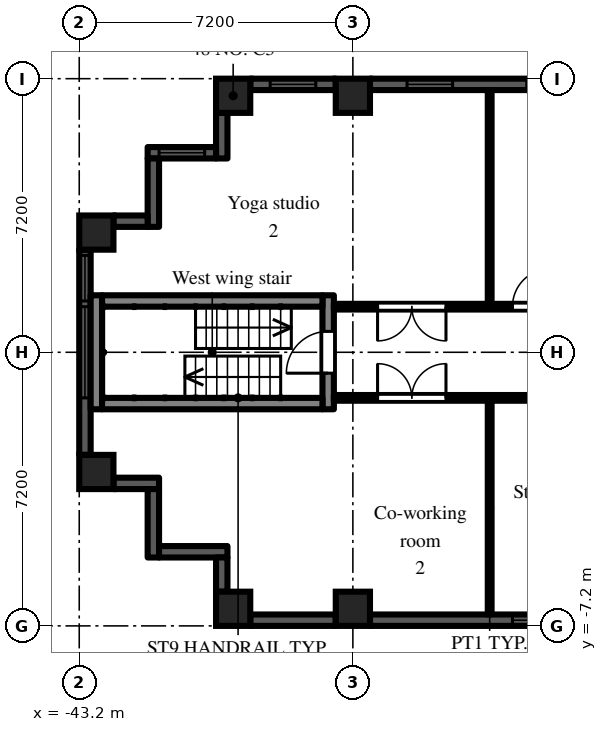
"""IFC4 building model, lengths in metres.
Left out: names, types, materials, properties, quantities, classifications, styles, units other than length and angle.
Written with IfcOpenShell. Run it as: python <this file> out.ifc"""

import sys

from ifc_helpers import new_model, si_unit, direction, frame, frame_2d, origin, origin_2d, place, context, subcontext, project, spatial, rectangle, extrude, element, fill, save


model = new_model("IFC4")
c1 = context("Model", 3, precision=1e-05, world=origin(), true_north=direction((0.0, 1.0)))
c2 = subcontext(c1, "Body", "Model", "MODEL_VIEW")
j1 = project(units=[si_unit("LENGTHUNIT", "METRE"), si_unit("PLANEANGLEUNIT", "RADIAN")], contexts=[c1])
p1 = place(None, origin())
s1 = spatial("IfcSite", under=j1, at=p1, CompositionType="ELEMENT")
p2 = place(p1, origin())
s2 = spatial("IfcBuilding", under=s1, at=p2, CompositionType="ELEMENT")
p3 = place(p2, frame((0.0, 0.0, 93.9)))
s3 = spatial("IfcBuildingStorey", under=s2, at=p3, CompositionType="ELEMENT", Elevation=93.9)
for number, where, z_axis, x_axis in (
    (1, (-42.75, -3.15, 0.0), (0.0, 0.0, 1.0), (1.0, 0.0, 0.0)),
    (2, (-42.75, 3.15, 0.0), (0.0, 0.0, 1.0), (1.0, 0.0, 0.0)),
    (3, (-39.15, -6.75, 0.0), (0.0, 0.0, 1.0), (1.0, 0.0, 0.0)),
    (4, (-39.15, 6.75, 0.0), (0.0, 0.0, 1.0), (1.0, 0.0, 0.0)),
    (5, (-36.0, -6.75, 0.0), (0.0, 0.0, 1.0), (1.0, 0.0, 0.0)),
    (6, (-36.0, 6.75, 0.0), (0.0, 0.0, 1.0), (1.0, 0.0, 0.0)),
):
    element("IfcColumn", number, at=place(p3, frame(where, z_axis=z_axis, x_axis=x_axis)), inside=s3, PredefinedType="COLUMN", context=c2, shape_type="SweptSolid", body=[
        extrude(rectangle(XDim=0.9, YDim=0.9, at=origin_2d()), origin(), (0.0, 0.0, 1.0), 3.0),
    ])
p4 = place(p3, frame((-29.25, 7.05, 0.0), z_axis=(0.0, 0.0, 1.0), x_axis=(-1.0, 0.0, 0.0)))
e7 = element("IfcWall", 7, at=p4, inside=s3, PredefinedType="SOLIDWALL", context=c2, shape_type="SweptSolid", body=[
    extrude(rectangle(XDim=6.3, YDim=0.3, at=frame_2d((3.15, 0.0))), origin(), (0.0, 0.0, 1.0), 2.1),
])
p5 = place(p4, frame((0.975, 0.0, 0.2)))
e8 = element("IfcOpeningElement", 8, at=p5, cuts=e7, PredefinedType="OPENING", context=c2, shape_type="SweptSolid", body=[
    extrude(rectangle(XDim=1.2, YDim=1.85, at=frame_2d((0.6, 0.925))), frame((0.0, 0.16, 0.0), z_axis=(0.0, -1.0, 0.0), x_axis=(1.0, 0.0, 0.0)), (0.0, 0.0, 1.0), 0.32),
])
p6 = place(p4, frame((4.125, 0.0, 0.2)))
e9 = element("IfcOpeningElement", 9, at=p6, cuts=e7, PredefinedType="OPENING", context=c2, shape_type="SweptSolid", body=[
    extrude(rectangle(XDim=1.2, YDim=1.85, at=frame_2d((0.6, 0.925))), frame((0.0, 0.16, 0.0), z_axis=(0.0, -1.0, 0.0), x_axis=(1.0, 0.0, 0.0)), (0.0, 0.0, 1.0), 0.32),
])
p7 = place(p3, frame((-36.45, 7.05, 0.0), z_axis=(0.0, 0.0, 1.0), x_axis=(-1.0, 0.0, 0.0)))
e10 = element("IfcWall", 10, at=p7, inside=s3, PredefinedType="SOLIDWALL", context=c2, shape_type="SweptSolid", body=[
    extrude(rectangle(XDim=2.25, YDim=0.3, at=frame_2d((1.125, 0.0))), origin(), (0.0, 0.0, 1.0), 2.1),
])
p8 = place(p7, frame((0.525, 0.0, 0.2)))
e11 = element("IfcOpeningElement", 11, at=p8, cuts=e10, PredefinedType="OPENING", context=c2, shape_type="SweptSolid", body=[
    extrude(rectangle(XDim=1.2, YDim=1.85, at=frame_2d((0.6, 0.925))), frame((0.0, 0.16, 0.0), z_axis=(0.0, -1.0, 0.0), x_axis=(1.0, 0.0, 0.0)), (0.0, 0.0, 1.0), 0.32),
])
p9 = place(p3, frame((-39.45, 6.3, 0.0), z_axis=(0.0, 0.0, 1.0), x_axis=(0.0, -1.0, 0.0)))
e12 = element("IfcWall", 12, at=p9, inside=s3, PredefinedType="SOLIDWALL", context=c2, shape_type="SweptSolid", body=[
    extrude(rectangle(XDim=1.2, YDim=0.3, at=frame_2d((0.6, 0.0))), origin(), (0.0, 0.0, 1.0), 2.575),
])
p10 = place(p3, frame((-39.6, 5.25, 0.0), z_axis=(0.0, 0.0, 1.0), x_axis=(-1.0, 0.0, 0.0)))
e13 = element("IfcWall", 13, at=p10, inside=s3, PredefinedType="SOLIDWALL", context=c2, shape_type="SweptSolid", body=[
    extrude(rectangle(XDim=1.8, YDim=0.3, at=frame_2d((0.9, 0.0))), origin(), (0.0, 0.0, 1.0), 2.575),
])
p11 = place(p10, frame((0.3, 0.0, 0.2)))
e14 = element("IfcOpeningElement", 14, at=p11, cuts=e13, PredefinedType="OPENING", context=c2, shape_type="SweptSolid", body=[
    extrude(rectangle(XDim=1.2, YDim=1.85, at=frame_2d((0.6, 0.925))), frame((0.0, 0.16, 0.0), z_axis=(0.0, -1.0, 0.0), x_axis=(1.0, 0.0, 0.0)), (0.0, 0.0, 1.0), 0.32),
])
p12 = place(p3, frame((-41.25, 5.1, 0.0), z_axis=(0.0, 0.0, 1.0), x_axis=(0.0, -1.0, 0.0)))
e15 = element("IfcWall", 15, at=p12, inside=s3, PredefinedType="SOLIDWALL", context=c2, shape_type="SweptSolid", body=[
    extrude(rectangle(XDim=1.8, YDim=0.3, at=frame_2d((0.9, 0.0))), origin(), (0.0, 0.0, 1.0), 2.575),
])
p13 = place(p3, frame((-41.4, 3.45, 0.0), z_axis=(0.0, 0.0, 1.0), x_axis=(-1.0, 0.0, 0.0)))
e16 = element("IfcWall", 16, at=p13, inside=s3, PredefinedType="SOLIDWALL", context=c2, shape_type="SweptSolid", body=[
    extrude(rectangle(XDim=0.9, YDim=0.3, at=frame_2d((0.45, 0.0))), origin(), (0.0, 0.0, 1.0), 2.575),
])
p14 = place(p3, frame((-43.05, 2.7, 0.0), z_axis=(0.0, 0.0, 1.0), x_axis=(0.0, -1.0, 0.0)))
e17 = element("IfcWall", 17, at=p14, inside=s3, PredefinedType="SOLIDWALL", context=c2, shape_type="SweptSolid", body=[
    extrude(rectangle(XDim=5.4, YDim=0.3, at=frame_2d((2.7, 0.0))), origin(), (0.0, 0.0, 1.0), 2.1),
])
p15 = place(p14, frame((1.5, 0.0, 0.2)))
e18 = element("IfcOpeningElement", 18, at=p15, cuts=e17, PredefinedType="OPENING", context=c2, shape_type="SweptSolid", body=[
    extrude(rectangle(XDim=2.4, YDim=1.85, at=frame_2d((1.2, 0.925))), frame((0.0, 0.16, 0.0), z_axis=(0.0, -1.0, 0.0), x_axis=(1.0, 0.0, 0.0)), (0.0, 0.0, 1.0), 0.32),
])
p16 = place(p14, frame((0.15, 0.0, 0.2)))
e19 = element("IfcOpeningElement", 19, at=p16, cuts=e17, PredefinedType="OPENING", context=c2, shape_type="SweptSolid", body=[
    extrude(rectangle(XDim=1.2, YDim=1.85, at=frame_2d((0.6, 0.925))), frame((0.0, 0.16, 0.0), z_axis=(0.0, -1.0, 0.0), x_axis=(1.0, 0.0, 0.0)), (0.0, 0.0, 1.0), 0.32),
])
p17 = place(p3, frame((-42.3, -3.45, 0.0), z_axis=(0.0, 0.0, 1.0), x_axis=(1.0, 0.0, 0.0)))
e20 = element("IfcWall", 20, at=p17, inside=s3, PredefinedType="SOLIDWALL", context=c2, shape_type="SweptSolid", body=[
    extrude(rectangle(XDim=1.2, YDim=0.3, at=frame_2d((0.6, 0.0))), origin(), (0.0, 0.0, 1.0), 2.575),
])
p18 = place(p3, frame((-41.25, -3.6, 0.0), z_axis=(0.0, 0.0, 1.0), x_axis=(0.0, -1.0, 0.0)))
e21 = element("IfcWall", 21, at=p18, inside=s3, PredefinedType="SOLIDWALL", context=c2, shape_type="SweptSolid", body=[
    extrude(rectangle(XDim=1.8, YDim=0.3, at=frame_2d((0.9, 0.0))), origin(), (0.0, 0.0, 1.0), 2.575),
])
p19 = place(p3, frame((-41.1, -5.25, 0.0), z_axis=(0.0, 0.0, 1.0), x_axis=(1.0, 0.0, 0.0)))
e22 = element("IfcWall", 22, at=p19, inside=s3, PredefinedType="SOLIDWALL", context=c2, shape_type="SweptSolid", body=[
    extrude(rectangle(XDim=1.8, YDim=0.3, at=frame_2d((0.9, 0.0))), origin(), (0.0, 0.0, 1.0), 2.575),
])
p20 = place(p3, frame((-39.45, -5.4, 0.0), z_axis=(0.0, 0.0, 1.0), x_axis=(0.0, -1.0, 0.0)))
e23 = element("IfcWall", 23, at=p20, inside=s3, PredefinedType="SOLIDWALL", context=c2, shape_type="SweptSolid", body=[
    extrude(rectangle(XDim=0.9, YDim=0.3, at=frame_2d((0.45, 0.0))), origin(), (0.0, 0.0, 1.0), 2.575),
])
p21 = place(p3, frame((-38.7, -7.05, 0.0), z_axis=(0.0, 0.0, 1.0), x_axis=(1.0, 0.0, 0.0)))
e24 = element("IfcWall", 24, at=p21, inside=s3, PredefinedType="SOLIDWALL", context=c2, shape_type="SweptSolid", body=[
    extrude(rectangle(XDim=2.25, YDim=0.3, at=frame_2d((1.125, 0.0))), origin(), (0.0, 0.0, 1.0), 2.1),
])
p22 = place(p3, frame((-35.55, -7.05, 0.0), z_axis=(0.0, 0.0, 1.0), x_axis=(1.0, 0.0, 0.0)))
e25 = element("IfcWall", 25, at=p22, inside=s3, PredefinedType="SOLIDWALL", context=c2, shape_type="SweptSolid", body=[
    extrude(rectangle(XDim=6.3, YDim=0.3, at=frame_2d((3.15, 0.0))), origin(), (0.0, 0.0, 1.0), 2.1),
])
p23 = place(p22, frame((3.75, 0.0, 0.2)))
e26 = element("IfcOpeningElement", 26, at=p23, cuts=e25, PredefinedType="OPENING", context=c2, shape_type="SweptSolid", body=[
    extrude(rectangle(XDim=2.4, YDim=1.85, at=frame_2d((1.2, 0.925))), frame((0.0, 0.16, 0.0), z_axis=(0.0, -1.0, 0.0), x_axis=(1.0, 0.0, 0.0)), (0.0, 0.0, 1.0), 0.32),
])
p24 = place(p3, frame((-36.65, -1.5, 0.0), z_axis=(0.0, 0.0, 1.0), x_axis=(0.0, 1.0, 0.0)))
e27 = element("IfcWall", 27, at=p24, inside=s3, PredefinedType="SHEAR", context=c2, shape_type="SweptSolid", body=[
    extrude(rectangle(XDim=3.0, YDim=0.3, at=frame_2d((1.5, 0.0))), origin(), (0.0, 0.0, 1.0), 2.575),
])
p25 = place(p24, frame((0.95, 0.0, 0.0)))
e28 = element("IfcOpeningElement", 28, at=p25, cuts=e27, PredefinedType="OPENING", context=c2, shape_type="SweptSolid", body=[
    extrude(rectangle(XDim=1.1, YDim=2.1, at=frame_2d((0.55, 1.05))), frame((0.0, 0.16, 0.0), z_axis=(0.0, -1.0, 0.0), x_axis=(1.0, 0.0, 0.0)), (0.0, 0.0, 1.0), 0.32),
])
p26 = place(p3, frame((-42.75, -1.5, 0.0), z_axis=(0.0, 0.0, 1.0), x_axis=(0.0, 1.0, 0.0)))
e29 = element("IfcWall", 29, at=p26, inside=s3, PredefinedType="SHEAR", context=c2, shape_type="SweptSolid", body=[
    extrude(rectangle(XDim=3.0, YDim=0.3, at=frame_2d((1.5, 0.0))), origin(), (0.0, 0.0, 1.0), 2.575),
])
for number, where, z_axis, x_axis in (
    (30, (-36.8, -1.35, 0.0), (0.0, 0.0, 1.0), (-1.0, 0.0, 0.0)),
    (31, (-36.8, 1.35, 0.0), (0.0, 0.0, 1.0), (-1.0, 0.0, 0.0)),
):
    element("IfcWall", number, at=place(p3, frame(where, z_axis=z_axis, x_axis=x_axis)), inside=s3, PredefinedType="SHEAR", context=c2, shape_type="SweptSolid", body=[
        extrude(rectangle(XDim=5.8, YDim=0.3, at=frame_2d((2.9, 0.0))), origin(), (0.0, 0.0, 1.0), 2.575),
    ])
p27 = place(p3, frame((-36.5, -1.2, 0.0), z_axis=(0.0, 0.0, 1.0), x_axis=(1.0, 0.0, 0.0)))
e32 = element("IfcWall", 32, at=p27, inside=s3, PredefinedType="PARTITIONING", context=c2, shape_type="SweptSolid", body=[
    extrude(rectangle(XDim=14.9, YDim=0.15, at=frame_2d((7.45, 0.0))), origin(), (0.0, 0.0, 1.0), 2.575),
])
p28 = place(p27, frame((7.9, 0.0, 0.0)))
e33 = element("IfcOpeningElement", 33, at=p28, cuts=e32, PredefinedType="OPENING", context=c2, shape_type="SweptSolid", body=[
    extrude(rectangle(XDim=1.0, YDim=2.1, at=frame_2d((0.5, 1.05))), frame((0.0, 0.085, 0.0), z_axis=(0.0, -1.0, 0.0), x_axis=(1.0, 0.0, 0.0)), (0.0, 0.0, 1.0), 0.17),
])
p29 = place(p27, frame((5.45, 0.0, 0.0)))
e34 = element("IfcOpeningElement", 34, at=p29, cuts=e32, PredefinedType="OPENING", context=c2, shape_type="SweptSolid", body=[
    extrude(rectangle(XDim=0.9, YDim=2.1, at=frame_2d((0.45, 1.05))), frame((0.0, 0.085, 0.0), z_axis=(0.0, -1.0, 0.0), x_axis=(1.0, 0.0, 0.0)), (0.0, 0.0, 1.0), 0.17),
])
p30 = place(p27, frame((1.15, 0.0, 0.0)))
e35 = element("IfcOpeningElement", 35, at=p30, cuts=e32, PredefinedType="OPENING", context=c2, shape_type="SweptSolid", body=[
    extrude(rectangle(XDim=1.8, YDim=2.1, at=frame_2d((0.9, 1.05))), frame((0.0, 0.085, 0.0), z_axis=(0.0, -1.0, 0.0), x_axis=(1.0, 0.0, 0.0)), (0.0, 0.0, 1.0), 0.17),
])
p31 = place(p3, frame((-36.5, 1.2, 0.0), z_axis=(0.0, 0.0, 1.0), x_axis=(1.0, 0.0, 0.0)))
e36 = element("IfcWall", 36, at=p31, inside=s3, PredefinedType="PARTITIONING", context=c2, shape_type="SweptSolid", body=[
    extrude(rectangle(XDim=14.9, YDim=0.15, at=frame_2d((7.45, 0.0))), origin(), (0.0, 0.0, 1.0), 2.575),
])
p32 = place(p31, frame((10.4, 0.0, 0.0)))
e37 = element("IfcOpeningElement", 37, at=p32, cuts=e36, PredefinedType="OPENING", context=c2, shape_type="SweptSolid", body=[
    extrude(rectangle(XDim=1.8, YDim=2.1, at=frame_2d((0.9, 1.05))), frame((0.0, 0.085, 0.0), z_axis=(0.0, -1.0, 0.0), x_axis=(1.0, 0.0, 0.0)), (0.0, 0.0, 1.0), 0.17),
])
p33 = place(p31, frame((4.7, 0.0, 0.0)))
e38 = element("IfcOpeningElement", 38, at=p33, cuts=e36, PredefinedType="OPENING", context=c2, shape_type="SweptSolid", body=[
    extrude(rectangle(XDim=1.0, YDim=2.1, at=frame_2d((0.5, 1.05))), frame((0.0, 0.085, 0.0), z_axis=(0.0, -1.0, 0.0), x_axis=(1.0, 0.0, 0.0)), (0.0, 0.0, 1.0), 0.17),
])
p34 = place(p31, frame((1.15, 0.0, 0.0)))
e39 = element("IfcOpeningElement", 39, at=p34, cuts=e36, PredefinedType="OPENING", context=c2, shape_type="SweptSolid", body=[
    extrude(rectangle(XDim=1.8, YDim=2.1, at=frame_2d((0.9, 1.05))), frame((0.0, 0.085, 0.0), z_axis=(0.0, -1.0, 0.0), x_axis=(1.0, 0.0, 0.0)), (0.0, 0.0, 1.0), 0.17),
])
for number, where, z_axis, x_axis in (
    (40, (-32.4, -6.9, 0.0), (0.0, 0.0, 1.0), (0.0, 1.0, 0.0)),
    (41, (-32.4, 1.275, 0.0), (0.0, 0.0, 1.0), (0.0, 1.0, 0.0)),
):
    element("IfcWall", number, at=place(p3, frame(where, z_axis=z_axis, x_axis=x_axis)), inside=s3, PredefinedType="PARTITIONING", context=c2, shape_type="SweptSolid", body=[
        extrude(rectangle(XDim=5.625, YDim=0.1, at=frame_2d((2.812, 0.0))), origin(), (0.0, 0.0, 1.0), 2.575),
    ])
p35 = place(p5, origin())
e42 = element("IfcWindow", 42, at=p35, inside=s3, PartitioningType="SINGLE_PANEL", PredefinedType="WINDOW", context=c2, shape_type="SweptSolid", body=[
    extrude(rectangle(XDim=1.2, YDim=1.85, at=frame_2d((0.6, 0.925))), frame((0.0, 0.03, 0.0), z_axis=(0.0, -1.0, 0.0), x_axis=(1.0, 0.0, 0.0)), (0.0, 0.0, 1.0), 0.06),
])
fill(e8, e42)
p36 = place(p6, origin())
e43 = element("IfcWindow", 43, at=p36, inside=s3, PartitioningType="SINGLE_PANEL", PredefinedType="WINDOW", context=c2, shape_type="SweptSolid", body=[
    extrude(rectangle(XDim=1.2, YDim=1.85, at=frame_2d((0.6, 0.925))), frame((0.0, 0.03, 0.0), z_axis=(0.0, -1.0, 0.0), x_axis=(1.0, 0.0, 0.0)), (0.0, 0.0, 1.0), 0.06),
])
fill(e9, e43)
p37 = place(p8, origin())
e44 = element("IfcWindow", 44, at=p37, inside=s3, PartitioningType="SINGLE_PANEL", PredefinedType="WINDOW", context=c2, shape_type="SweptSolid", body=[
    extrude(rectangle(XDim=1.2, YDim=1.85, at=frame_2d((0.6, 0.925))), frame((0.0, 0.03, 0.0), z_axis=(0.0, -1.0, 0.0), x_axis=(1.0, 0.0, 0.0)), (0.0, 0.0, 1.0), 0.06),
])
fill(e11, e44)
p38 = place(p11, origin())
e45 = element("IfcWindow", 45, at=p38, inside=s3, PartitioningType="SINGLE_PANEL", PredefinedType="WINDOW", context=c2, shape_type="SweptSolid", body=[
    extrude(rectangle(XDim=1.2, YDim=1.85, at=frame_2d((0.6, 0.925))), frame((0.0, 0.03, 0.0), z_axis=(0.0, -1.0, 0.0), x_axis=(1.0, 0.0, 0.0)), (0.0, 0.0, 1.0), 0.06),
])
fill(e14, e45)
p39 = place(p15, origin())
e46 = element("IfcWindow", 46, at=p39, inside=s3, PartitioningType="SINGLE_PANEL", PredefinedType="WINDOW", context=c2, shape_type="SweptSolid", body=[
    extrude(rectangle(XDim=2.4, YDim=1.85, at=frame_2d((1.2, 0.925))), frame((0.0, 0.03, 0.0), z_axis=(0.0, -1.0, 0.0), x_axis=(1.0, 0.0, 0.0)), (0.0, 0.0, 1.0), 0.06),
])
fill(e18, e46)
p40 = place(p16, origin())
e47 = element("IfcWindow", 47, at=p40, inside=s3, PartitioningType="SINGLE_PANEL", PredefinedType="WINDOW", context=c2, shape_type="SweptSolid", body=[
    extrude(rectangle(XDim=1.2, YDim=1.85, at=frame_2d((0.6, 0.925))), frame((0.0, 0.03, 0.0), z_axis=(0.0, -1.0, 0.0), x_axis=(1.0, 0.0, 0.0)), (0.0, 0.0, 1.0), 0.06),
])
fill(e19, e47)
p41 = place(p23, origin())
e48 = element("IfcWindow", 48, at=p41, inside=s3, PartitioningType="SINGLE_PANEL", PredefinedType="WINDOW", context=c2, shape_type="SweptSolid", body=[
    extrude(rectangle(XDim=2.4, YDim=1.85, at=frame_2d((1.2, 0.925))), frame((0.0, 0.03, 0.0), z_axis=(0.0, -1.0, 0.0), x_axis=(1.0, 0.0, 0.0)), (0.0, 0.0, 1.0), 0.06),
])
fill(e26, e48)
p42 = place(p25, origin())
e49 = element("IfcDoor", 49, at=p42, inside=s3, OperationType="SINGLE_SWING_LEFT", PredefinedType="DOOR", context=c2, shape_type="SweptSolid", body=[
    extrude(rectangle(XDim=1.1, YDim=2.1, at=frame_2d((0.55, 1.05))), frame((0.0, 0.025, 0.0), z_axis=(0.0, -1.0, 0.0), x_axis=(1.0, 0.0, 0.0)), (0.0, 0.0, 1.0), 0.05),
])
fill(e28, e49)
p43 = place(p30, origin())
e50 = element("IfcDoor", 50, at=p43, inside=s3, OperationType="DOUBLE_DOOR_DOUBLE_SWING", PredefinedType="DOOR", context=c2, shape_type="SweptSolid", body=[
    extrude(rectangle(XDim=1.8, YDim=2.1, at=frame_2d((0.9, 1.05))), frame((0.0, 0.025, 0.0), z_axis=(0.0, -1.0, 0.0), x_axis=(1.0, 0.0, 0.0)), (0.0, 0.0, 1.0), 0.05),
])
fill(e35, e50)
p44 = place(p33, origin())
e51 = element("IfcDoor", 51, at=p44, inside=s3, OperationType="SINGLE_SWING_RIGHT", PredefinedType="DOOR", context=c2, shape_type="SweptSolid", body=[
    extrude(rectangle(XDim=1.0, YDim=2.1, at=frame_2d((0.5, 1.05))), frame((0.0, 0.025, 0.0), z_axis=(0.0, -1.0, 0.0), x_axis=(1.0, 0.0, 0.0)), (0.0, 0.0, 1.0), 0.05),
])
fill(e38, e51)
p45 = place(p34, frame((1.8, 0.0, 0.0), z_axis=(0.0, 0.0, 1.0), x_axis=(-1.0, 0.0, 0.0)))
e52 = element("IfcDoor", 52, at=p45, inside=s3, OperationType="DOUBLE_DOOR_DOUBLE_SWING", PredefinedType="DOOR", context=c2, shape_type="SweptSolid", body=[
    extrude(rectangle(XDim=1.8, YDim=2.1, at=frame_2d((0.9, 1.05))), frame((0.0, 0.025, 0.0), z_axis=(0.0, -1.0, 0.0), x_axis=(1.0, 0.0, 0.0)), (0.0, 0.0, 1.0), 0.05),
])
fill(e39, e52)
save(model, sys.argv[1])
